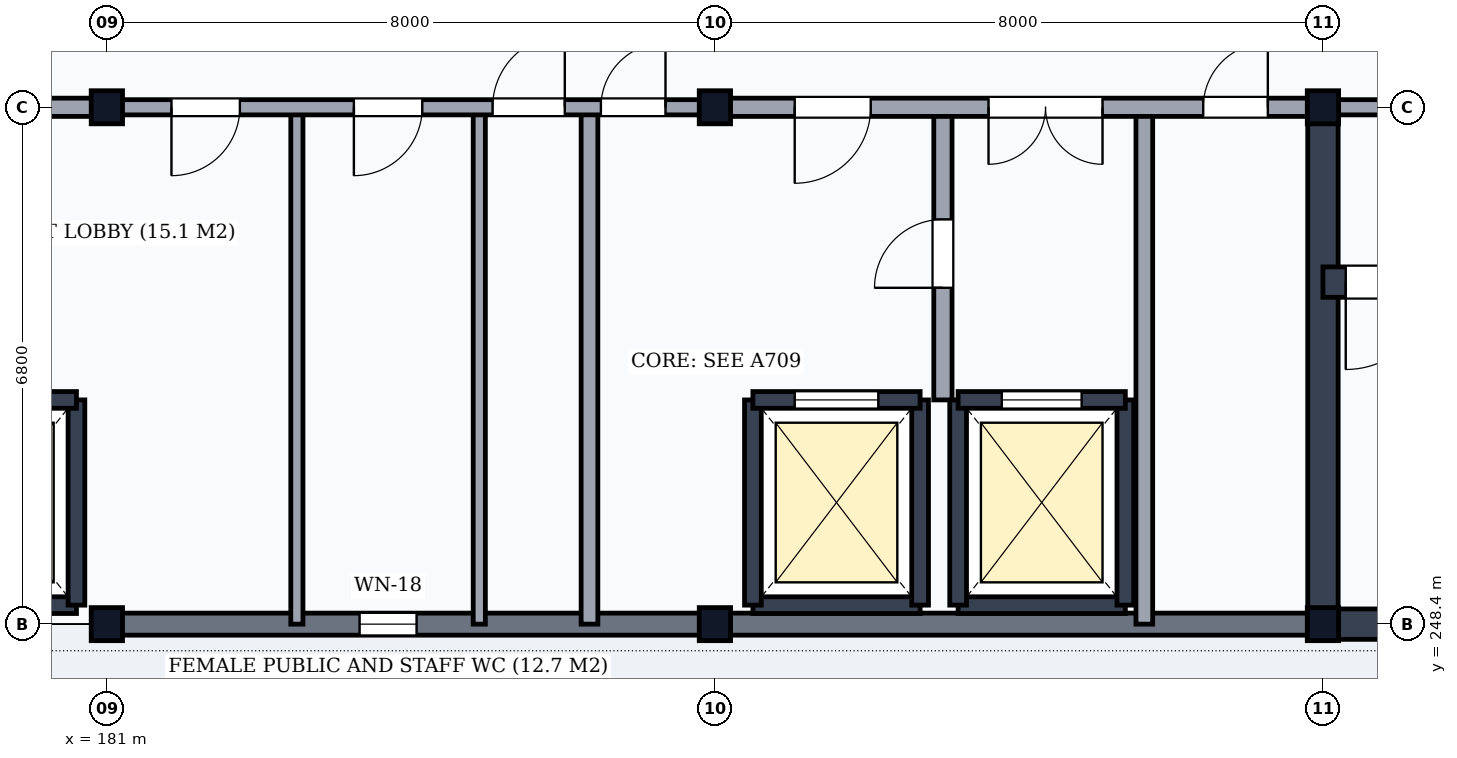
"""IFC4 building model, lengths in metres.
Left out: names, types, materials, properties, quantities, classifications, styles, units other than length and angle.
Written with IfcOpenShell. Run it as: python <this file> out.ifc"""

import sys

from ifc_helpers import new_model, si_unit, direction, frame, frame_2d, origin, origin_2d, place, context, subcontext, project, spatial, rectangle, i_section, extrude, element, fill, save


model = new_model("IFC4")
c1 = context("Model", 3, precision=1e-05, world=origin(), true_north=direction((0.0, 1.0)))
c2 = subcontext(c1, "Body", "Model", "MODEL_VIEW")
j1 = project(units=[si_unit("LENGTHUNIT", "METRE"), si_unit("PLANEANGLEUNIT", "RADIAN")], contexts=[c1])
p1 = place(None, origin())
s1 = spatial("IfcSite", under=j1, at=p1, CompositionType="ELEMENT")
p2 = place(p1, origin())
s2 = spatial("IfcBuilding", under=s1, at=p2, CompositionType="ELEMENT")
p3 = place(p2, frame((0.0, 0.0, 5.4)))
s3 = spatial("IfcBuildingStorey", under=s2, at=p3, CompositionType="ELEMENT", Elevation=5.4)
for number, where, z_axis, x_axis in (
    (1, (181.0, 248.4, 0.0), (0.0, 0.0, 1.0), (1.0, 0.0, 0.0)),
    (2, (181.0, 255.2, 0.0), (0.0, 0.0, 1.0), (1.0, 0.0, 0.0)),
    (3, (189.0, 248.4, 0.0), (0.0, 0.0, 1.0), (1.0, 0.0, 0.0)),
    (4, (189.0, 255.2, 0.0), (0.0, 0.0, 1.0), (1.0, 0.0, 0.0)),
    (5, (197.0, 248.4, 0.0), (0.0, 0.0, 1.0), (1.0, 0.0, 0.0)),
    (6, (197.0, 255.2, 0.0), (0.0, 0.0, 1.0), (1.0, 0.0, 0.0)),
):
    element("IfcColumn", number, at=place(p3, frame(where, z_axis=z_axis, x_axis=x_axis)), inside=s3, PredefinedType="COLUMN", context=c2, shape_type="SweptSolid", body=[
        extrude(i_section(OverallWidth=0.412, OverallDepth=0.435, WebThickness=0.036, FlangeThickness=0.057, FilletRadius=0.015, at=origin_2d()), origin(), (0.0, 0.0, 1.0), 5.1),
    ])
p4 = place(p3, frame((181.006, 248.4, 0.0), z_axis=(0.0, 0.0, 1.0), x_axis=(1.0, 0.0, 0.0)))
e7 = element("IfcWall", 7, at=p4, inside=s3, PredefinedType="SOLIDWALL", context=c2, shape_type="SweptSolid", body=[
    extrude(rectangle(XDim=7.988, YDim=0.29, at=frame_2d((3.994, 0.0))), origin(), (0.0, 0.0, 1.0), 4.548),
])
p5 = place(p4, frame((3.319, 0.0, 0.85)))
e8 = element("IfcOpeningElement", 8, at=p5, cuts=e7, PredefinedType="OPENING", context=c2, shape_type="SweptSolid", body=[
    extrude(rectangle(XDim=0.75, YDim=2.0, at=frame_2d((0.375, 1.0))), frame((0.0, 0.16, 0.0), z_axis=(0.0, -1.0, 0.0), x_axis=(1.0, 0.0, 0.0)), (0.0, 0.0, 1.0), 0.32),
])
p6 = place(p3, frame((189.006, 248.4, 0.0), z_axis=(0.0, 0.0, 1.0), x_axis=(1.0, 0.0, 0.0)))
e9 = element("IfcWall", 9, at=p6, inside=s3, PredefinedType="SOLIDWALL", context=c2, shape_type="SweptSolid", body=[
    extrude(rectangle(XDim=7.988, YDim=0.29, at=frame_2d((3.994, 0.0))), origin(), (0.0, 0.0, 1.0), 4.548),
])
p7 = place(p3, frame((197.0, 248.4, 0.0), z_axis=(0.0, 0.0, 1.0), x_axis=(1.0, 0.0, 0.0)))
e10 = element("IfcWall", 10, at=p7, inside=s3, PredefinedType="SHEAR", context=c2, shape_type="SweptSolid", body=[
    extrude(rectangle(XDim=8.0, YDim=0.4, at=frame_2d((4.0, 0.0))), origin(), (0.0, 0.0, 1.0), 4.86),
])
p8 = place(p3, frame((197.0, 248.4, 0.0), z_axis=(0.0, 0.0, 1.0), x_axis=(0.0, 1.0, 0.0)))
e11 = element("IfcWall", 11, at=p8, inside=s3, PredefinedType="SHEAR", context=c2, shape_type="SweptSolid", body=[
    extrude(rectangle(XDim=6.8, YDim=0.4, at=frame_2d((3.4, 0.0))), origin(), (0.0, 0.0, 1.0), 4.86),
])
p9 = place(p3, frame((197.0, 252.9, 0.0), z_axis=(0.0, 0.0, 1.0), x_axis=(1.0, 0.0, 0.0)))
e12 = element("IfcWall", 12, at=p9, inside=s3, PredefinedType="SHEAR", context=c2, shape_type="SweptSolid", body=[
    extrude(rectangle(XDim=8.0, YDim=0.4, at=frame_2d((4.0, 0.0))), origin(), (0.0, 0.0, 1.0), 4.86),
])
p10 = place(p9, frame((0.3, 0.0, 0.0)))
e13 = element("IfcOpeningElement", 13, at=p10, cuts=e12, PredefinedType="OPENING", context=c2, shape_type="SweptSolid", body=[
    extrude(rectangle(XDim=1.15, YDim=2.15, at=frame_2d((0.575, 1.075))), frame((0.0, 0.215, 0.0), z_axis=(0.0, -1.0, 0.0), x_axis=(1.0, 0.0, 0.0)), (0.0, 0.0, 1.0), 0.43),
])
p11 = place(p3, frame((197.0, 255.2, 0.0), z_axis=(0.0, 0.0, 1.0), x_axis=(1.0, 0.0, 0.0)))
e14 = element("IfcWall", 14, at=p11, inside=s3, PredefinedType="PARTITIONING", context=c2, shape_type="SweptSolid", body=[
    extrude(rectangle(XDim=8.0, YDim=0.2, at=frame_2d((4.0, 0.0))), origin(), (0.0, 0.0, 1.0), 4.358),
])
p12 = place(p11, frame((3.275, 0.0, 0.0)))
e15 = element("IfcOpeningElement", 15, at=p12, cuts=e14, PredefinedType="OPENING", context=c2, shape_type="SweptSolid", body=[
    extrude(rectangle(XDim=1.45, YDim=2.2, at=frame_2d((0.725, 1.1))), frame((0.0, 0.115, 0.0), z_axis=(0.0, -1.0, 0.0), x_axis=(1.0, 0.0, 0.0)), (0.0, 0.0, 1.0), 0.23),
])
p13 = place(p3, frame((178.4, 248.65, 0.0), z_axis=(0.0, 0.0, 1.0), x_axis=(1.0, 0.0, 0.0)))
e16 = element("IfcWall", 16, at=p13, inside=s3, PredefinedType="SHEAR", context=c2, shape_type="SweptSolid", body=[
    extrude(rectangle(XDim=2.2, YDim=0.22, at=frame_2d((1.1, 0.0))), origin(), (0.0, 0.0, 1.0), 4.86),
])
p14 = place(p3, frame((180.6, 248.65, 0.0), z_axis=(0.0, 0.0, 1.0), x_axis=(0.0, 1.0, 0.0)))
e17 = element("IfcWall", 17, at=p14, inside=s3, PredefinedType="SHEAR", context=c2, shape_type="SweptSolid", body=[
    extrude(rectangle(XDim=2.7, YDim=0.22, at=frame_2d((1.35, 0.0))), origin(), (0.0, 0.0, 1.0), 4.86),
])
p15 = place(p3, frame((178.4, 251.35, 0.0), z_axis=(0.0, 0.0, 1.0), x_axis=(1.0, 0.0, 0.0)))
e18 = element("IfcWall", 18, at=p15, inside=s3, PredefinedType="SHEAR", context=c2, shape_type="SweptSolid", body=[
    extrude(rectangle(XDim=2.2, YDim=0.22, at=frame_2d((1.1, 0.0))), origin(), (0.0, 0.0, 1.0), 4.86),
])
p16 = place(p15, frame((0.575, 0.0, 0.0)))
e19 = element("IfcOpeningElement", 19, at=p16, cuts=e18, PredefinedType="OPENING", context=c2, shape_type="SweptSolid", body=[
    extrude(rectangle(XDim=1.05, YDim=2.15, at=frame_2d((0.525, 1.075))), frame((0.0, 0.125, 0.0), z_axis=(0.0, -1.0, 0.0), x_axis=(1.0, 0.0, 0.0)), (0.0, 0.0, 1.0), 0.25),
])
p17 = place(p3, frame((189.5, 248.65, 0.0), z_axis=(0.0, 0.0, 1.0), x_axis=(1.0, 0.0, 0.0)))
e20 = element("IfcWall", 20, at=p17, inside=s3, PredefinedType="SHEAR", context=c2, shape_type="SweptSolid", body=[
    extrude(rectangle(XDim=2.2, YDim=0.22, at=frame_2d((1.1, 0.0))), origin(), (0.0, 0.0, 1.0), 4.86),
])
for number, where, z_axis, x_axis in (
    (21, (189.5, 248.65, 0.0), (0.0, 0.0, 1.0), (0.0, 1.0, 0.0)),
    (22, (191.7, 248.65, 0.0), (0.0, 0.0, 1.0), (0.0, 1.0, 0.0)),
):
    element("IfcWall", number, at=place(p3, frame(where, z_axis=z_axis, x_axis=x_axis)), inside=s3, PredefinedType="SHEAR", context=c2, shape_type="SweptSolid", body=[
        extrude(rectangle(XDim=2.7, YDim=0.22, at=frame_2d((1.35, 0.0))), origin(), (0.0, 0.0, 1.0), 4.86),
    ])
p18 = place(p3, frame((189.5, 251.35, 0.0), z_axis=(0.0, 0.0, 1.0), x_axis=(1.0, 0.0, 0.0)))
e23 = element("IfcWall", 23, at=p18, inside=s3, PredefinedType="SHEAR", context=c2, shape_type="SweptSolid", body=[
    extrude(rectangle(XDim=2.2, YDim=0.22, at=frame_2d((1.1, 0.0))), origin(), (0.0, 0.0, 1.0), 4.86),
])
p19 = place(p18, frame((0.55, 0.0, 0.0)))
e24 = element("IfcOpeningElement", 24, at=p19, cuts=e23, PredefinedType="OPENING", context=c2, shape_type="SweptSolid", body=[
    extrude(rectangle(XDim=1.1, YDim=2.15, at=frame_2d((0.55, 1.075))), frame((0.0, 0.125, 0.0), z_axis=(0.0, -1.0, 0.0), x_axis=(1.0, 0.0, 0.0)), (0.0, 0.0, 1.0), 0.25),
])
p20 = place(p3, frame((192.2, 248.65, 0.0), z_axis=(0.0, 0.0, 1.0), x_axis=(1.0, 0.0, 0.0)))
e25 = element("IfcWall", 25, at=p20, inside=s3, PredefinedType="SHEAR", context=c2, shape_type="SweptSolid", body=[
    extrude(rectangle(XDim=2.2, YDim=0.22, at=frame_2d((1.1, 0.0))), origin(), (0.0, 0.0, 1.0), 4.86),
])
for number, where, z_axis, x_axis in (
    (26, (192.2, 248.65, 0.0), (0.0, 0.0, 1.0), (0.0, 1.0, 0.0)),
    (27, (194.4, 248.65, 0.0), (0.0, 0.0, 1.0), (0.0, 1.0, 0.0)),
):
    element("IfcWall", number, at=place(p3, frame(where, z_axis=z_axis, x_axis=x_axis)), inside=s3, PredefinedType="SHEAR", context=c2, shape_type="SweptSolid", body=[
        extrude(rectangle(XDim=2.7, YDim=0.22, at=frame_2d((1.35, 0.0))), origin(), (0.0, 0.0, 1.0), 4.86),
    ])
p21 = place(p3, frame((192.2, 251.35, 0.0), z_axis=(0.0, 0.0, 1.0), x_axis=(1.0, 0.0, 0.0)))
e28 = element("IfcWall", 28, at=p21, inside=s3, PredefinedType="SHEAR", context=c2, shape_type="SweptSolid", body=[
    extrude(rectangle(XDim=2.2, YDim=0.22, at=frame_2d((1.1, 0.0))), origin(), (0.0, 0.0, 1.0), 4.86),
])
p22 = place(p21, frame((0.575, 0.0, 0.0)))
e29 = element("IfcOpeningElement", 29, at=p22, cuts=e28, PredefinedType="OPENING", context=c2, shape_type="SweptSolid", body=[
    extrude(rectangle(XDim=1.05, YDim=2.15, at=frame_2d((0.525, 1.075))), frame((0.0, 0.125, 0.0), z_axis=(0.0, -1.0, 0.0), x_axis=(1.0, 0.0, 0.0)), (0.0, 0.0, 1.0), 0.25),
])
p23 = place(p3, frame((192.0, 251.35, 0.0), z_axis=(0.0, 0.0, 1.0), x_axis=(0.0, 1.0, 0.0)))
e30 = element("IfcWall", 30, at=p23, inside=s3, PredefinedType="PARTITIONING", context=c2, shape_type="SweptSolid", body=[
    extrude(rectangle(XDim=3.85, YDim=0.24, at=frame_2d((1.925, 0.0))), origin(), (0.0, 0.0, 1.0), 4.86),
])
p24 = place(p23, frame((1.475, 0.0, 0.0)))
e31 = element("IfcOpeningElement", 31, at=p24, cuts=e30, PredefinedType="OPENING", context=c2, shape_type="SweptSolid", body=[
    extrude(rectangle(XDim=0.9, YDim=2.1, at=frame_2d((0.45, 1.05))), frame((0.0, 0.135, 0.0), z_axis=(0.0, -1.0, 0.0), x_axis=(1.0, 0.0, 0.0)), (0.0, 0.0, 1.0), 0.27),
])
p25 = place(p3, frame((194.65, 248.4, 0.0), z_axis=(0.0, 0.0, 1.0), x_axis=(0.0, 1.0, 0.0)))
e32 = element("IfcWall", 32, at=p25, inside=s3, PredefinedType="PARTITIONING", context=c2, shape_type="SweptSolid", body=[
    extrude(rectangle(XDim=6.8, YDim=0.22, at=frame_2d((3.4, 0.0))), origin(), (0.0, 0.0, 1.0), 4.86),
])
for number, where, z_axis, x_axis in (
    (33, (183.5, 248.4, 0.0), (0.0, 0.0, 1.0), (0.0, 1.0, 0.0)),
    (34, (185.9, 248.4, 0.0), (0.0, 0.0, 1.0), (0.0, 1.0, 0.0)),
):
    element("IfcWall", number, at=place(p3, frame(where, z_axis=z_axis, x_axis=x_axis)), inside=s3, PredefinedType="PARTITIONING", context=c2, shape_type="SweptSolid", body=[
        extrude(rectangle(XDim=6.8, YDim=0.16, at=frame_2d((3.4, 0.0))), origin(), (0.0, 0.0, 1.0), 4.86),
    ])
p26 = place(p3, frame((187.35, 248.4, 0.0), z_axis=(0.0, 0.0, 1.0), x_axis=(0.0, 1.0, 0.0)))
e35 = element("IfcWall", 35, at=p26, inside=s3, PredefinedType="PARTITIONING", context=c2, shape_type="SweptSolid", body=[
    extrude(rectangle(XDim=6.8, YDim=0.22, at=frame_2d((3.4, 0.0))), origin(), (0.0, 0.0, 1.0), 4.86),
])
p27 = place(p3, frame((173.0, 255.2, 0.0), z_axis=(0.0, 0.0, 1.0), x_axis=(1.0, 0.0, 0.0)))
e36 = element("IfcWall", 36, at=p27, inside=s3, PredefinedType="PARTITIONING", context=c2, shape_type="SweptSolid", body=[
    extrude(rectangle(XDim=8.0, YDim=0.24, at=frame_2d((4.0, 0.0))), origin(), (0.0, 0.0, 1.0), 4.358),
])
p28 = place(p27, frame((1.05, 0.0, 0.0)))
e37 = element("IfcOpeningElement", 37, at=p28, cuts=e36, PredefinedType="OPENING", context=c2, shape_type="SweptSolid", body=[
    extrude(rectangle(XDim=1.0, YDim=2.1, at=frame_2d((0.5, 1.05))), frame((0.0, 0.135, 0.0), z_axis=(0.0, -1.0, 0.0), x_axis=(1.0, 0.0, 0.0)), (0.0, 0.0, 1.0), 0.27),
])
p29 = place(p27, frame((4.6, 0.0, 0.0)))
e38 = element("IfcOpeningElement", 38, at=p29, cuts=e36, PredefinedType="OPENING", context=c2, shape_type="SweptSolid", body=[
    extrude(rectangle(XDim=1.6, YDim=2.25, at=frame_2d((0.8, 1.125))), frame((0.0, 0.135, 0.0), z_axis=(0.0, -1.0, 0.0), x_axis=(1.0, 0.0, 0.0)), (0.0, 0.0, 1.0), 0.27),
])
p30 = place(p3, frame((181.0, 255.2, 0.0), z_axis=(0.0, 0.0, 1.0), x_axis=(1.0, 0.0, 0.0)))
e39 = element("IfcWall", 39, at=p30, inside=s3, PredefinedType="PARTITIONING", context=c2, shape_type="SweptSolid", body=[
    extrude(rectangle(XDim=8.0, YDim=0.2, at=frame_2d((4.0, 0.0))), origin(), (0.0, 0.0, 1.0), 4.358),
])
p31 = place(p30, frame((0.85, 0.0, 0.0)))
e40 = element("IfcOpeningElement", 40, at=p31, cuts=e39, PredefinedType="OPENING", context=c2, shape_type="SweptSolid", body=[
    extrude(rectangle(XDim=0.9, YDim=2.1, at=frame_2d((0.45, 1.05))), frame((0.0, 0.115, 0.0), z_axis=(0.0, -1.0, 0.0), x_axis=(1.0, 0.0, 0.0)), (0.0, 0.0, 1.0), 0.23),
])
p32 = place(p30, frame((3.25, 0.0, 0.0)))
e41 = element("IfcOpeningElement", 41, at=p32, cuts=e39, PredefinedType="OPENING", context=c2, shape_type="SweptSolid", body=[
    extrude(rectangle(XDim=0.9, YDim=2.1, at=frame_2d((0.45, 1.05))), frame((0.0, 0.115, 0.0), z_axis=(0.0, -1.0, 0.0), x_axis=(1.0, 0.0, 0.0)), (0.0, 0.0, 1.0), 0.23),
])
p33 = place(p30, frame((5.075, 0.0, 0.0)))
e42 = element("IfcOpeningElement", 42, at=p33, cuts=e39, PredefinedType="OPENING", context=c2, shape_type="SweptSolid", body=[
    extrude(rectangle(XDim=0.95, YDim=2.1, at=frame_2d((0.475, 1.05))), frame((0.0, 0.115, 0.0), z_axis=(0.0, -1.0, 0.0), x_axis=(1.0, 0.0, 0.0)), (0.0, 0.0, 1.0), 0.23),
])
p34 = place(p30, frame((6.5, 0.0, 0.0)))
e43 = element("IfcOpeningElement", 43, at=p34, cuts=e39, PredefinedType="OPENING", context=c2, shape_type="SweptSolid", body=[
    extrude(rectangle(XDim=0.85, YDim=2.1, at=frame_2d((0.425, 1.05))), frame((0.0, 0.115, 0.0), z_axis=(0.0, -1.0, 0.0), x_axis=(1.0, 0.0, 0.0)), (0.0, 0.0, 1.0), 0.23),
])
p35 = place(p3, frame((189.0, 255.2, 0.0), z_axis=(0.0, 0.0, 1.0), x_axis=(1.0, 0.0, 0.0)))
e44 = element("IfcWall", 44, at=p35, inside=s3, PredefinedType="PARTITIONING", context=c2, shape_type="SweptSolid", body=[
    extrude(rectangle(XDim=8.0, YDim=0.24, at=frame_2d((4.0, 0.0))), origin(), (0.0, 0.0, 1.0), 4.358),
])
p36 = place(p35, frame((1.05, 0.0, 0.0)))
e45 = element("IfcOpeningElement", 45, at=p36, cuts=e44, PredefinedType="OPENING", context=c2, shape_type="SweptSolid", body=[
    extrude(rectangle(XDim=1.0, YDim=2.1, at=frame_2d((0.5, 1.05))), frame((0.0, 0.135, 0.0), z_axis=(0.0, -1.0, 0.0), x_axis=(1.0, 0.0, 0.0)), (0.0, 0.0, 1.0), 0.27),
])
p37 = place(p35, frame((3.6, 0.0, 0.0)))
e46 = element("IfcOpeningElement", 46, at=p37, cuts=e44, PredefinedType="OPENING", context=c2, shape_type="SweptSolid", body=[
    extrude(rectangle(XDim=1.5, YDim=2.25, at=frame_2d((0.75, 1.125))), frame((0.0, 0.135, 0.0), z_axis=(0.0, -1.0, 0.0), x_axis=(1.0, 0.0, 0.0)), (0.0, 0.0, 1.0), 0.27),
])
p38 = place(p35, frame((6.425, 0.0, 0.0)))
e47 = element("IfcOpeningElement", 47, at=p38, cuts=e44, PredefinedType="OPENING", context=c2, shape_type="SweptSolid", body=[
    extrude(rectangle(XDim=0.85, YDim=2.1, at=frame_2d((0.425, 1.05))), frame((0.0, 0.135, 0.0), z_axis=(0.0, -1.0, 0.0), x_axis=(1.0, 0.0, 0.0)), (0.0, 0.0, 1.0), 0.27),
])
p39 = place(p5, origin())
e48 = element("IfcWindow", 48, at=p39, inside=s3, PartitioningType="SINGLE_PANEL", PredefinedType="WINDOW", context=c2, shape_type="SweptSolid", body=[
    extrude(rectangle(XDim=0.75, YDim=2.0, at=frame_2d((0.375, 1.0))), frame((0.0, 0.03, 0.0), z_axis=(0.0, -1.0, 0.0), x_axis=(1.0, 0.0, 0.0)), (0.0, 0.0, 1.0), 0.06),
])
fill(e8, e48)
p40 = place(p10, frame((1.15, 0.0, 0.0), z_axis=(0.0, 0.0, 1.0), x_axis=(-1.0, 0.0, 0.0)))
e49 = element("IfcDoor", 49, at=p40, inside=s3, OperationType="SINGLE_SWING_RIGHT", PredefinedType="DOOR", context=c2, shape_type="SweptSolid", body=[
    extrude(rectangle(XDim=1.15, YDim=2.15, at=frame_2d((0.575, 1.075))), frame((0.0, 0.025, 0.0), z_axis=(0.0, -1.0, 0.0), x_axis=(1.0, 0.0, 0.0)), (0.0, 0.0, 1.0), 0.05),
])
fill(e13, e49)
p41 = place(p19, origin())
e50 = element("IfcDoor", 50, at=p41, inside=s3, OperationType="DOUBLE_DOOR_SLIDING", PredefinedType="USERDEFINED", context=c2, shape_type="SweptSolid", body=[
    extrude(rectangle(XDim=1.1, YDim=2.15, at=frame_2d((0.55, 1.075))), frame((0.0, 0.025, 0.0), z_axis=(0.0, -1.0, 0.0), x_axis=(1.0, 0.0, 0.0)), (0.0, 0.0, 1.0), 0.05),
])
fill(e24, e50)
p42 = place(p22, origin())
e51 = element("IfcDoor", 51, at=p42, inside=s3, OperationType="DOUBLE_DOOR_SLIDING", PredefinedType="USERDEFINED", context=c2, shape_type="SweptSolid", body=[
    extrude(rectangle(XDim=1.05, YDim=2.15, at=frame_2d((0.525, 1.075))), frame((0.0, 0.025, 0.0), z_axis=(0.0, -1.0, 0.0), x_axis=(1.0, 0.0, 0.0)), (0.0, 0.0, 1.0), 0.05),
])
fill(e29, e51)
p43 = place(p24, origin())
e52 = element("IfcDoor", 52, at=p43, inside=s3, OperationType="SINGLE_SWING_LEFT", PredefinedType="DOOR", context=c2, shape_type="SweptSolid", body=[
    extrude(rectangle(XDim=0.9, YDim=2.1, at=frame_2d((0.45, 1.05))), frame((0.0, 0.025, 0.0), z_axis=(0.0, -1.0, 0.0), x_axis=(1.0, 0.0, 0.0)), (0.0, 0.0, 1.0), 0.05),
])
fill(e31, e52)
p44 = place(p31, frame((0.9, 0.0, 0.0), z_axis=(0.0, 0.0, 1.0), x_axis=(-1.0, 0.0, 0.0)))
e53 = element("IfcDoor", 53, at=p44, inside=s3, OperationType="SINGLE_SWING_RIGHT", PredefinedType="DOOR", context=c2, shape_type="SweptSolid", body=[
    extrude(rectangle(XDim=0.9, YDim=2.1, at=frame_2d((0.45, 1.05))), frame((0.0, 0.025, 0.0), z_axis=(0.0, -1.0, 0.0), x_axis=(1.0, 0.0, 0.0)), (0.0, 0.0, 1.0), 0.05),
])
fill(e40, e53)
p45 = place(p32, frame((0.9, 0.0, 0.0), z_axis=(0.0, 0.0, 1.0), x_axis=(-1.0, 0.0, 0.0)))
e54 = element("IfcDoor", 54, at=p45, inside=s3, OperationType="SINGLE_SWING_RIGHT", PredefinedType="DOOR", context=c2, shape_type="SweptSolid", body=[
    extrude(rectangle(XDim=0.9, YDim=2.1, at=frame_2d((0.45, 1.05))), frame((0.0, 0.025, 0.0), z_axis=(0.0, -1.0, 0.0), x_axis=(1.0, 0.0, 0.0)), (0.0, 0.0, 1.0), 0.05),
])
fill(e41, e54)
p46 = place(p33, frame((0.95, 0.0, 0.0), z_axis=(0.0, 0.0, 1.0), x_axis=(-1.0, 0.0, 0.0)))
e55 = element("IfcDoor", 55, at=p46, inside=s3, OperationType="SINGLE_SWING_LEFT", PredefinedType="DOOR", context=c2, shape_type="SweptSolid", body=[
    extrude(rectangle(XDim=0.95, YDim=2.1, at=frame_2d((0.475, 1.05))), frame((0.0, 0.025, 0.0), z_axis=(0.0, -1.0, 0.0), x_axis=(1.0, 0.0, 0.0)), (0.0, 0.0, 1.0), 0.05),
])
fill(e42, e55)
p47 = place(p34, frame((0.85, 0.0, 0.0), z_axis=(0.0, 0.0, 1.0), x_axis=(-1.0, 0.0, 0.0)))
e56 = element("IfcDoor", 56, at=p47, inside=s3, OperationType="SINGLE_SWING_LEFT", PredefinedType="DOOR", context=c2, shape_type="SweptSolid", body=[
    extrude(rectangle(XDim=0.85, YDim=2.1, at=frame_2d((0.425, 1.05))), frame((0.0, 0.025, 0.0), z_axis=(0.0, -1.0, 0.0), x_axis=(1.0, 0.0, 0.0)), (0.0, 0.0, 1.0), 0.05),
])
fill(e43, e56)
p48 = place(p36, frame((1.0, 0.0, 0.0), z_axis=(0.0, 0.0, 1.0), x_axis=(-1.0, 0.0, 0.0)))
e57 = element("IfcDoor", 57, at=p48, inside=s3, OperationType="SINGLE_SWING_RIGHT", PredefinedType="DOOR", context=c2, shape_type="SweptSolid", body=[
    extrude(rectangle(XDim=1.0, YDim=2.1, at=frame_2d((0.5, 1.05))), frame((0.0, 0.025, 0.0), z_axis=(0.0, -1.0, 0.0), x_axis=(1.0, 0.0, 0.0)), (0.0, 0.0, 1.0), 0.05),
])
fill(e45, e57)
p49 = place(p37, frame((1.5, 0.0, 0.0), z_axis=(0.0, 0.0, 1.0), x_axis=(-1.0, 0.0, 0.0)))
e58 = element("IfcDoor", 58, at=p49, inside=s3, OperationType="DOUBLE_DOOR_SINGLE_SWING", PredefinedType="DOOR", context=c2, shape_type="SweptSolid", body=[
    extrude(rectangle(XDim=1.5, YDim=2.25, at=frame_2d((0.75, 1.125))), frame((0.0, 0.025, 0.0), z_axis=(0.0, -1.0, 0.0), x_axis=(1.0, 0.0, 0.0)), (0.0, 0.0, 1.0), 0.05),
])
fill(e46, e58)
p50 = place(p38, frame((0.85, 0.0, 0.0), z_axis=(0.0, 0.0, 1.0), x_axis=(-1.0, 0.0, 0.0)))
e59 = element("IfcDoor", 59, at=p50, inside=s3, OperationType="SINGLE_SWING_LEFT", PredefinedType="DOOR", context=c2, shape_type="SweptSolid", body=[
    extrude(rectangle(XDim=0.85, YDim=2.1, at=frame_2d((0.425, 1.05))), frame((0.0, 0.025, 0.0), z_axis=(0.0, -1.0, 0.0), x_axis=(1.0, 0.0, 0.0)), (0.0, 0.0, 1.0), 0.05),
])
fill(e47, e59)
save(model, sys.argv[1])
